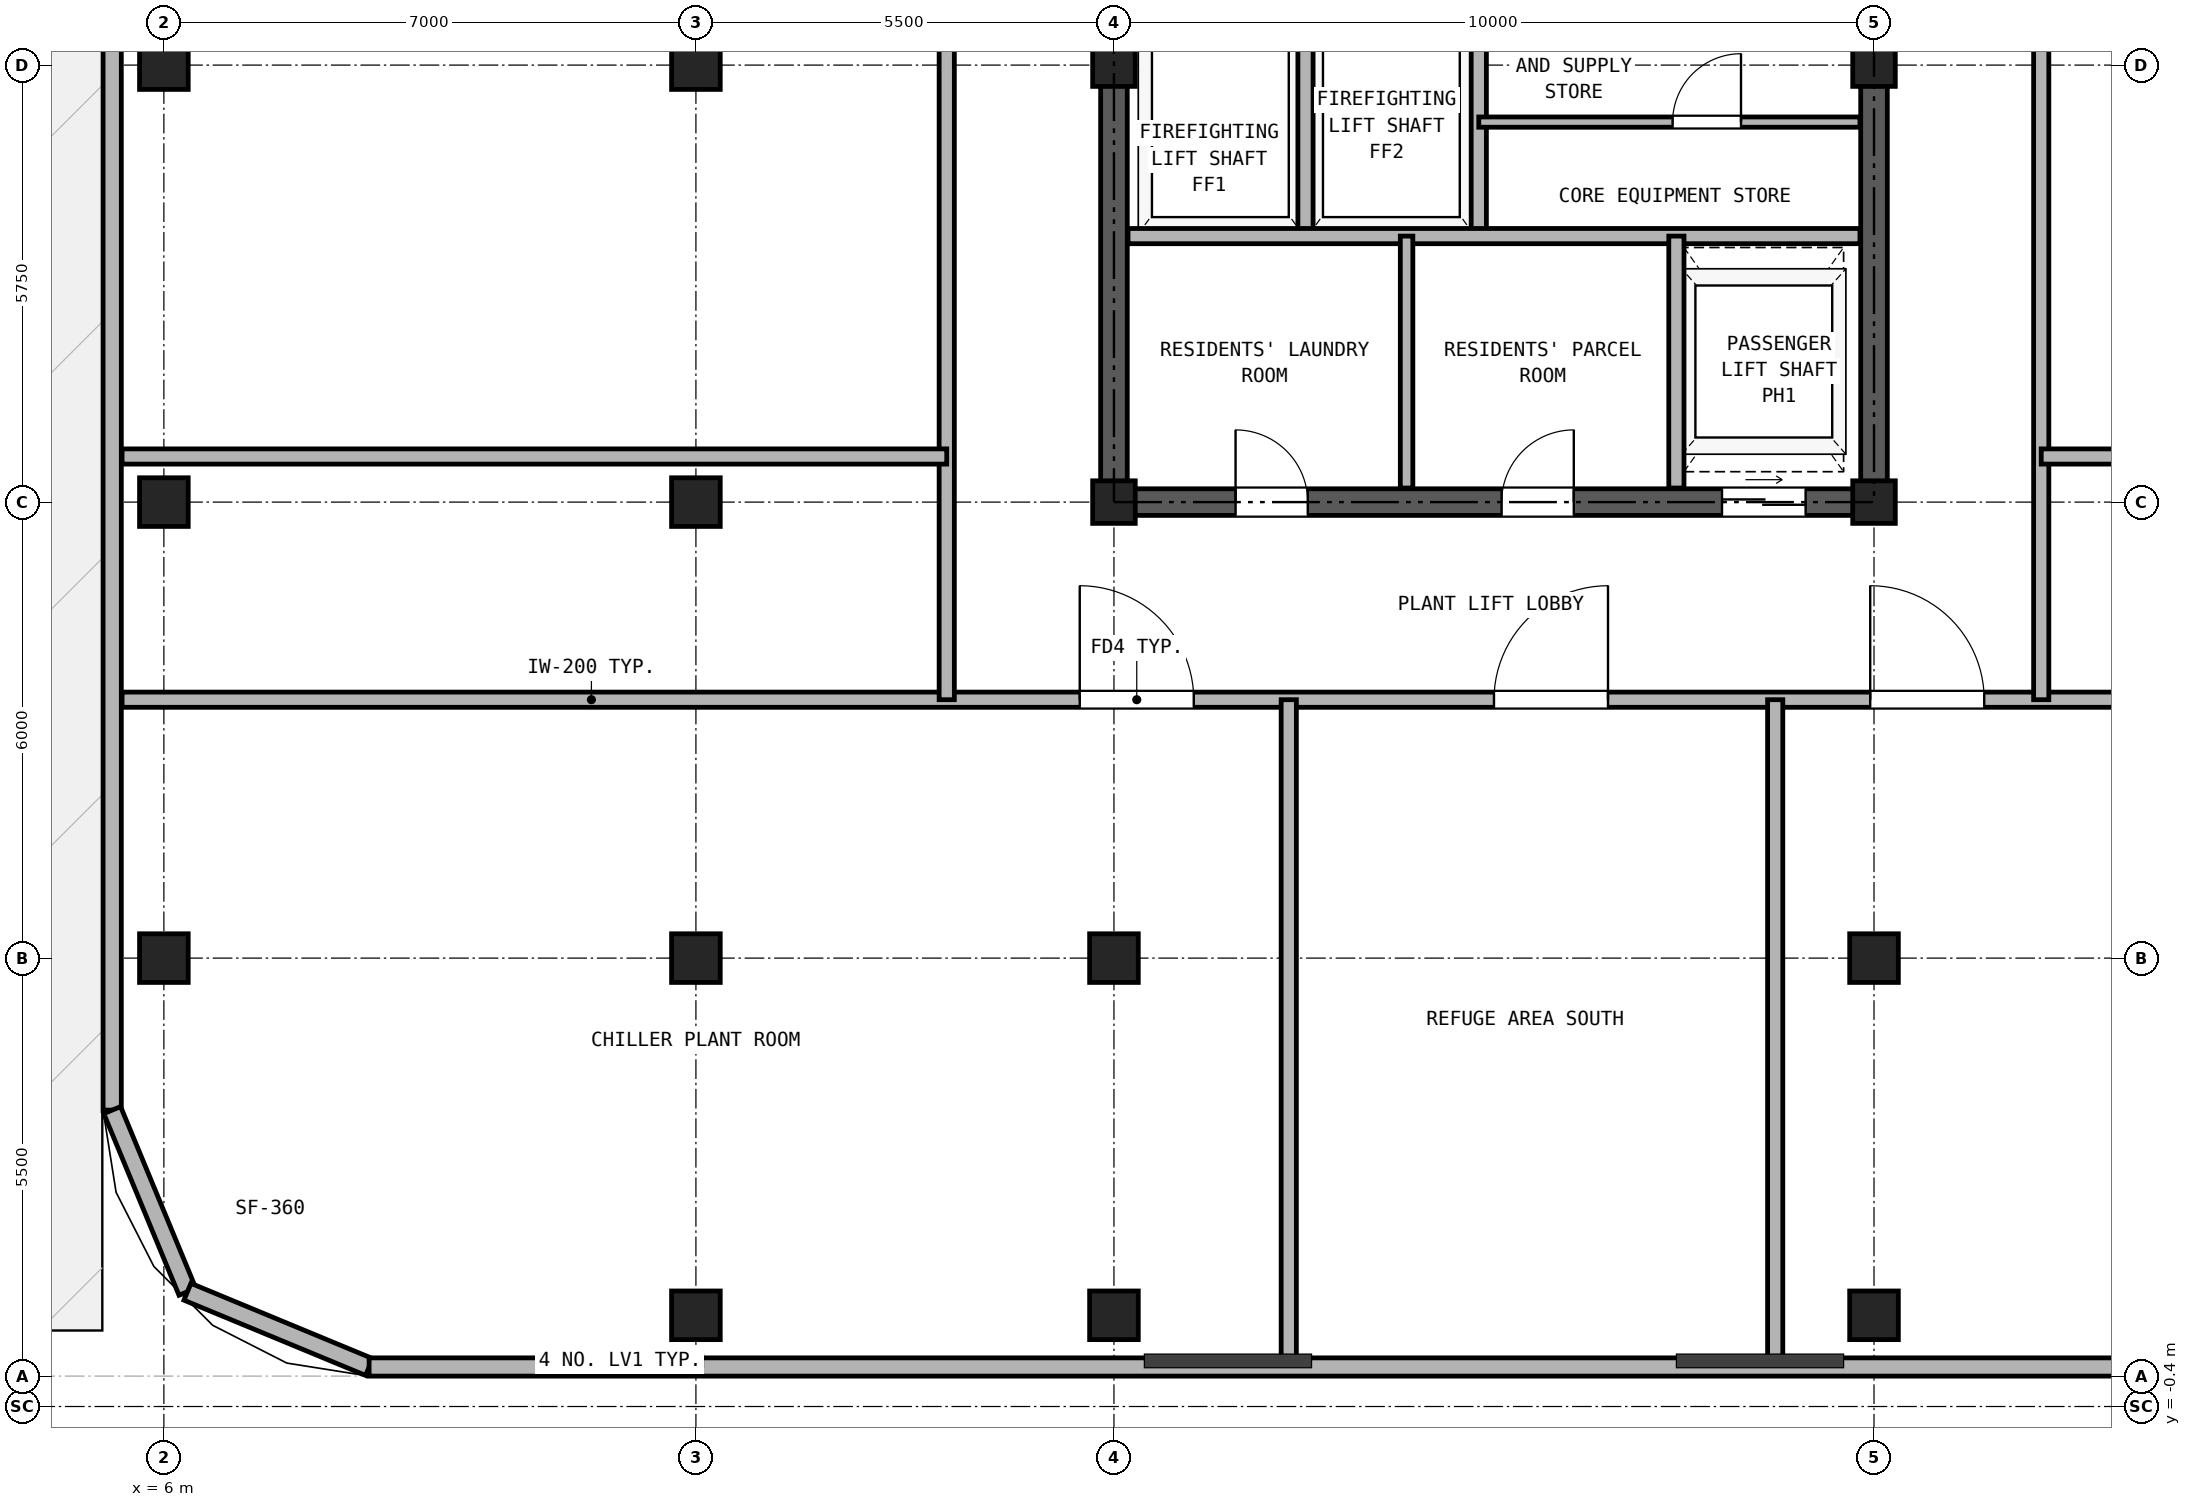
"""IFC4 building model, lengths in metres.
Left out: names, types, materials, properties, quantities, classifications, styles, units other than length and angle.
Written with IfcOpenShell. Run it as: python <this file> out.ifc"""

import sys

from ifc_helpers import new_model, si_unit, direction, frame, frame_2d, origin, origin_2d, place, context, subcontext, project, spatial, rectangle, hollow_rectangle, extrude, source, transform, mapped, element, fill, save


model = new_model("IFC4")
c1 = context("Model", 3, precision=1e-05, world=origin(), true_north=direction((0.0, 1.0)))
c2 = subcontext(c1, "Body", "Model", "MODEL_VIEW")
j1 = project(units=[si_unit("LENGTHUNIT", "METRE"), si_unit("PLANEANGLEUNIT", "RADIAN")], contexts=[c1])
p1 = place(None, origin())
s1 = spatial("IfcSite", under=j1, at=p1, CompositionType="ELEMENT")
p2 = place(p1, origin())
s2 = spatial("IfcBuilding", under=s1, at=p2, CompositionType="ELEMENT")
p3 = place(p2, frame((0.0, 0.0, 215.6)))
s3 = spatial("IfcBuildingStorey", under=s2, at=p3, CompositionType="ELEMENT", Elevation=215.6)
m1 = source(origin(), c2, "Body", "SweptSolid", [
    extrude(hollow_rectangle(XDim=0.64, YDim=0.64, WallThickness=0.035, at=origin_2d()), origin(), (0.0, 0.0, 1.0), 4.28),
])
for number, where, z_axis, x_axis in (
    (1, (13.0, 0.8, 0.0), (0.0, 0.0, 1.0), (1.0, 0.0, 0.0)),
    (2, (18.5, 0.8, 0.0), (0.0, 0.0, 1.0), (1.0, 0.0, 0.0)),
    (3, (28.5, 0.8, 0.0), (0.0, 0.0, 1.0), (1.0, 0.0, 0.0)),
    (4, (6.0, 5.5, 0.0), (0.0, 0.0, 1.0), (1.0, 0.0, 0.0)),
    (5, (6.0, 11.5, 0.0), (0.0, 0.0, 1.0), (1.0, 0.0, 0.0)),
    (6, (6.0, 17.25, 0.0), (0.0, 0.0, 1.0), (1.0, 0.0, 0.0)),
    (7, (13.0, 5.5, 0.0), (0.0, 0.0, 1.0), (1.0, 0.0, 0.0)),
    (8, (13.0, 11.5, 0.0), (0.0, 0.0, 1.0), (1.0, 0.0, 0.0)),
    (9, (13.0, 17.25, 0.0), (0.0, 0.0, 1.0), (1.0, 0.0, 0.0)),
    (10, (18.5, 5.5, 0.0), (0.0, 0.0, 1.0), (1.0, 0.0, 0.0)),
):
    element("IfcColumn", number, at=place(p3, frame(where, z_axis=z_axis, x_axis=x_axis)), inside=s3, PredefinedType="COLUMN", context=c2, shape_type="MappedRepresentation", body=[
        mapped(m1, transform((0.0, 0.0, 0.0), x_axis=(1.0, 0.0, 0.0), y_axis=(0.0, 1.0, 0.0), z_axis=(0.0, 0.0, 1.0), scale=1.0)),
    ])
m2 = source(origin(), c2, "Body", "SweptSolid", [
    extrude(hollow_rectangle(XDim=0.56, YDim=0.56, WallThickness=0.03, at=origin_2d()), origin(), (0.0, 0.0, 1.0), 4.28),
])
for number, where, z_axis, x_axis in (
    (11, (18.5, 11.5, 0.0), (0.0, 0.0, 1.0), (1.0, 0.0, 0.0)),
    (12, (18.5, 17.25, 0.0), (0.0, 0.0, 1.0), (1.0, 0.0, 0.0)),
):
    element("IfcColumn", number, at=place(p3, frame(where, z_axis=z_axis, x_axis=x_axis)), inside=s3, PredefinedType="COLUMN", context=c2, shape_type="MappedRepresentation", body=[
        mapped(m2, transform((0.0, 0.0, 0.0), x_axis=(1.0, 0.0, 0.0), y_axis=(0.0, 1.0, 0.0), z_axis=(0.0, 0.0, 1.0), scale=1.0)),
    ])
p4 = place(p3, frame((28.5, 5.5, 0.0), z_axis=(0.0, 0.0, 1.0), x_axis=(1.0, 0.0, 0.0)))
e13 = element("IfcColumn", 13, at=p4, inside=s3, PredefinedType="COLUMN", context=c2, shape_type="MappedRepresentation", body=[
    mapped(m1, transform((0.0, 0.0, 0.0), x_axis=(1.0, 0.0, 0.0), y_axis=(0.0, 1.0, 0.0), z_axis=(0.0, 0.0, 1.0), scale=1.0)),
])
for number, where, z_axis, x_axis in (
    (14, (28.5, 11.5, 0.0), (0.0, 0.0, 1.0), (1.0, 0.0, 0.0)),
    (15, (28.5, 17.25, 0.0), (0.0, 0.0, 1.0), (1.0, 0.0, 0.0)),
):
    element("IfcColumn", number, at=place(p3, frame(where, z_axis=z_axis, x_axis=x_axis)), inside=s3, PredefinedType="COLUMN", context=c2, shape_type="MappedRepresentation", body=[
        mapped(m2, transform((0.0, 0.0, 0.0), x_axis=(1.0, 0.0, 0.0), y_axis=(0.0, 1.0, 0.0), z_axis=(0.0, 0.0, 1.0), scale=1.0)),
    ])
p5 = place(p3, frame((5.32, 31.8, 0.0), z_axis=(0.0, 0.0, 1.0), x_axis=(0.0, -1.0, 0.0)))
e16 = element("IfcWall", 16, at=p5, inside=s3, PredefinedType="SOLIDWALL", context=c2, shape_type="SweptSolid", body=[
    extrude(rectangle(XDim=28.3, YDim=0.24, at=frame_2d((14.15, 0.0))), origin(), (0.0, 0.0, 1.0), 4.28),
])
for number, where, z_axis, x_axis in (
    (17, (5.32, 3.5, 0.0), (0.0, 0.0, 1.0), (0.383, -0.924, 0.0)),
    (18, (6.31, 1.11, 0.0), (0.0, 0.0, 1.0), (0.924, -0.383, 0.0)),
):
    element("IfcWall", number, at=place(p3, frame(where, z_axis=z_axis, x_axis=x_axis)), inside=s3, PredefinedType="SOLIDWALL", context=c2, shape_type="SweptSolid", body=[
        extrude(rectangle(XDim=2.587, YDim=0.24, at=frame_2d((1.293, 0.0))), origin(), (0.0, 0.0, 1.0), 4.28),
    ])
p6 = place(p3, frame((8.7, 0.12, 0.0), z_axis=(0.0, 0.0, 1.0), x_axis=(1.0, 0.0, 0.0)))
e19 = element("IfcWall", 19, at=p6, inside=s3, PredefinedType="SOLIDWALL", context=c2, shape_type="SweptSolid", body=[
    extrude(rectangle(XDim=29.6, YDim=0.24, at=frame_2d((14.8, 0.0))), origin(), (0.0, 0.0, 1.0), 4.28),
])
p7 = place(p3, frame((18.325, 11.5, 0.0), z_axis=(0.0, 0.0, 1.0), x_axis=(1.0, 0.0, 0.0)))
e20 = element("IfcWall", 20, at=p7, inside=s3, PredefinedType="SHEAR", context=c2, shape_type="SweptSolid", body=[
    extrude(rectangle(XDim=10.35, YDim=0.35, at=frame_2d((5.175, 0.0))), origin(), (0.0, 0.0, 1.0), 4.28),
])
p8 = place(p7, frame((1.775, 0.0, 0.0)))
e21 = element("IfcOpeningElement", 21, at=p8, cuts=e20, PredefinedType="OPENING", context=c2, shape_type="SweptSolid", body=[
    extrude(rectangle(XDim=0.95, YDim=2.15, at=frame_2d((0.475, 1.075))), frame((0.0, 0.185, 0.0), z_axis=(0.0, -1.0, 0.0), x_axis=(1.0, 0.0, 0.0)), (0.0, 0.0, 1.0), 0.37),
])
p9 = place(p7, frame((5.275, 0.0, 0.0)))
e22 = element("IfcOpeningElement", 22, at=p9, cuts=e20, PredefinedType="OPENING", context=c2, shape_type="SweptSolid", body=[
    extrude(rectangle(XDim=0.95, YDim=2.15, at=frame_2d((0.475, 1.075))), frame((0.0, 0.185, 0.0), z_axis=(0.0, -1.0, 0.0), x_axis=(1.0, 0.0, 0.0)), (0.0, 0.0, 1.0), 0.37),
])
p10 = place(p7, frame((8.175, 0.0, 0.0)))
e23 = element("IfcOpeningElement", 23, at=p10, cuts=e20, PredefinedType="OPENING", context=c2, shape_type="SweptSolid", body=[
    extrude(rectangle(XDim=1.1, YDim=2.25, at=frame_2d((0.55, 1.125))), frame((0.0, 0.185, 0.0), z_axis=(0.0, -1.0, 0.0), x_axis=(1.0, 0.0, 0.0)), (0.0, 0.0, 1.0), 0.37),
])
p11 = place(p3, frame((18.5, 11.675, 0.0), z_axis=(0.0, 0.0, 1.0), x_axis=(0.0, 1.0, 0.0)))
e24 = element("IfcWall", 24, at=p11, inside=s3, PredefinedType="SHEAR", context=c2, shape_type="SweptSolid", body=[
    extrude(rectangle(XDim=16.9, YDim=0.35, at=frame_2d((8.45, 0.0))), origin(), (0.0, 0.0, 1.0), 4.28),
])
p12 = place(p11, frame((7.475, 0.0, 0.0)))
e25 = element("IfcOpeningElement", 25, at=p12, cuts=e24, PredefinedType="OPENING", context=c2, shape_type="SweptSolid", body=[
    extrude(rectangle(XDim=1.15, YDim=2.2, at=frame_2d((0.575, 1.1))), frame((0.0, 0.185, 0.0), z_axis=(0.0, -1.0, 0.0), x_axis=(1.0, 0.0, 0.0)), (0.0, 0.0, 1.0), 0.37),
])
p13 = place(p3, frame((28.5, 11.675, 0.0), z_axis=(0.0, 0.0, 1.0), x_axis=(0.0, 1.0, 0.0)))
e26 = element("IfcWall", 26, at=p13, inside=s3, PredefinedType="SHEAR", context=c2, shape_type="SweptSolid", body=[
    extrude(rectangle(XDim=16.9, YDim=0.35, at=frame_2d((8.45, 0.0))), origin(), (0.0, 0.0, 1.0), 4.28),
])
p14 = place(p13, frame((7.475, 0.0, 0.0)))
e27 = element("IfcOpeningElement", 27, at=p14, cuts=e26, PredefinedType="OPENING", context=c2, shape_type="SweptSolid", body=[
    extrude(rectangle(XDim=1.15, YDim=2.2, at=frame_2d((0.575, 1.1))), frame((0.0, 0.185, 0.0), z_axis=(0.0, -1.0, 0.0), x_axis=(1.0, 0.0, 0.0)), (0.0, 0.0, 1.0), 0.37),
])
for number, where, z_axis, x_axis in (
    (28, (21.02, 15.0, 0.0), (0.0, 0.0, 1.0), (0.0, 1.0, 0.0)),
    (29, (23.3, 15.0, 0.0), (0.0, 0.0, 1.0), (0.0, 1.0, 0.0)),
):
    element("IfcWall", number, at=place(p3, frame(where, z_axis=z_axis, x_axis=x_axis)), inside=s3, PredefinedType="PARTITIONING", context=c2, shape_type="SweptSolid", body=[
        extrude(rectangle(XDim=3.0, YDim=0.2, at=frame_2d((1.5, 0.0))), origin(), (0.0, 0.0, 1.0), 4.28),
    ])
p15 = place(p3, frame((18.685, 15.0, 0.0), z_axis=(0.0, 0.0, 1.0), x_axis=(1.0, 0.0, 0.0)))
e30 = element("IfcWall", 30, at=p15, inside=s3, PredefinedType="PARTITIONING", context=c2, shape_type="SweptSolid", body=[
    extrude(rectangle(XDim=9.63, YDim=0.2, at=frame_2d((4.815, 0.0))), origin(), (0.0, 0.0, 1.0), 4.28),
])
p16 = place(p3, frame((23.3, 16.5, 0.0), z_axis=(0.0, 0.0, 1.0), x_axis=(1.0, 0.0, 0.0)))
e31 = element("IfcWall", 31, at=p16, inside=s3, PredefinedType="PARTITIONING", context=c2, shape_type="SweptSolid", body=[
    extrude(rectangle(XDim=5.015, YDim=0.135, at=frame_2d((2.507, 0.0))), origin(), (0.0, 0.0, 1.0), 4.28),
])
p17 = place(p16, frame((2.55, 0.0, 0.0)))
e32 = element("IfcOpeningElement", 32, at=p17, cuts=e31, PredefinedType="OPENING", context=c2, shape_type="SweptSolid", body=[
    extrude(rectangle(XDim=0.9, YDim=2.05, at=frame_2d((0.45, 1.025))), frame((0.0, 0.077, 0.0), z_axis=(0.0, -1.0, 0.0), x_axis=(1.0, 0.0, 0.0)), (0.0, 0.0, 1.0), 0.155),
])
p18 = place(p3, frame((22.35, 11.685, 0.0), z_axis=(0.0, 0.0, 1.0), x_axis=(0.0, 1.0, 0.0)))
e33 = element("IfcWall", 33, at=p18, inside=s3, PredefinedType="PARTITIONING", context=c2, shape_type="SweptSolid", body=[
    extrude(rectangle(XDim=3.315, YDim=0.165, at=frame_2d((1.657, 0.0))), origin(), (0.0, 0.0, 1.0), 4.28),
])
p19 = place(p3, frame((25.9, 11.685, 0.0), z_axis=(0.0, 0.0, 1.0), x_axis=(0.0, 1.0, 0.0)))
e34 = element("IfcWall", 34, at=p19, inside=s3, PredefinedType="PARTITIONING", context=c2, shape_type="SweptSolid", body=[
    extrude(rectangle(XDim=3.315, YDim=0.2, at=frame_2d((1.657, 0.0))), origin(), (0.0, 0.0, 1.0), 4.28),
])
p20 = place(p3, frame((5.45, 8.9, 0.0), z_axis=(0.0, 0.0, 1.0), x_axis=(1.0, 0.0, 0.0)))
e35 = element("IfcWall", 35, at=p20, inside=s3, PredefinedType="PARTITIONING", context=c2, shape_type="SweptSolid", body=[
    extrude(rectangle(XDim=36.1, YDim=0.2, at=frame_2d((18.05, 0.0))), origin(), (0.0, 0.0, 1.0), 4.28),
])
p21 = place(p20, frame((12.6, 0.0, 0.0)))
e36 = element("IfcOpeningElement", 36, at=p21, cuts=e35, PredefinedType="OPENING", context=c2, shape_type="SweptSolid", body=[
    extrude(rectangle(XDim=1.5, YDim=2.25, at=frame_2d((0.75, 1.125))), frame((0.0, 0.11, 0.0), z_axis=(0.0, -1.0, 0.0), x_axis=(1.0, 0.0, 0.0)), (0.0, 0.0, 1.0), 0.22),
])
p22 = place(p20, frame((18.05, 0.0, 0.0)))
e37 = element("IfcOpeningElement", 37, at=p22, cuts=e35, PredefinedType="OPENING", context=c2, shape_type="SweptSolid", body=[
    extrude(rectangle(XDim=1.5, YDim=2.25, at=frame_2d((0.75, 1.125))), frame((0.0, 0.11, 0.0), z_axis=(0.0, -1.0, 0.0), x_axis=(1.0, 0.0, 0.0)), (0.0, 0.0, 1.0), 0.22),
])
p23 = place(p20, frame((23.0, 0.0, 0.0)))
e38 = element("IfcOpeningElement", 38, at=p23, cuts=e35, PredefinedType="OPENING", context=c2, shape_type="SweptSolid", body=[
    extrude(rectangle(XDim=1.5, YDim=2.25, at=frame_2d((0.75, 1.125))), frame((0.0, 0.11, 0.0), z_axis=(0.0, -1.0, 0.0), x_axis=(1.0, 0.0, 0.0)), (0.0, 0.0, 1.0), 0.22),
])
p24 = place(p3, frame((16.3, 8.9, 0.0), z_axis=(0.0, 0.0, 1.0), x_axis=(0.0, 1.0, 0.0)))
e39 = element("IfcWall", 39, at=p24, inside=s3, PredefinedType="PARTITIONING", context=c2, shape_type="SweptSolid", body=[
    extrude(rectangle(XDim=19.85, YDim=0.2, at=frame_2d((9.925, 0.0))), origin(), (0.0, 0.0, 1.0), 4.28),
])
p25 = place(p24, frame((10.6, 0.0, 0.0)))
e40 = element("IfcOpeningElement", 40, at=p25, cuts=e39, PredefinedType="OPENING", context=c2, shape_type="SweptSolid", body=[
    extrude(rectangle(XDim=1.05, YDim=2.15, at=frame_2d((0.525, 1.075))), frame((0.0, 0.11, 0.0), z_axis=(0.0, -1.0, 0.0), x_axis=(1.0, 0.0, 0.0)), (0.0, 0.0, 1.0), 0.22),
])
p26 = place(p3, frame((30.7, 8.9, 0.0), z_axis=(0.0, 0.0, 1.0), x_axis=(0.0, 1.0, 0.0)))
e41 = element("IfcWall", 41, at=p26, inside=s3, PredefinedType="PARTITIONING", context=c2, shape_type="SweptSolid", body=[
    extrude(rectangle(XDim=19.85, YDim=0.2, at=frame_2d((9.925, 0.0))), origin(), (0.0, 0.0, 1.0), 4.28),
])
p27 = place(p26, frame((10.6, 0.0, 0.0)))
e42 = element("IfcOpeningElement", 42, at=p27, cuts=e41, PredefinedType="OPENING", context=c2, shape_type="SweptSolid", body=[
    extrude(rectangle(XDim=1.5, YDim=2.25, at=frame_2d((0.75, 1.125))), frame((0.0, 0.11, 0.0), z_axis=(0.0, -1.0, 0.0), x_axis=(1.0, 0.0, 0.0)), (0.0, 0.0, 1.0), 0.22),
])
for number, where, z_axis, x_axis in (
    (43, (20.8, 0.25, 0.0), (0.0, 0.0, 1.0), (0.0, 1.0, 0.0)),
    (44, (27.2, 0.25, 0.0), (0.0, 0.0, 1.0), (0.0, 1.0, 0.0)),
):
    element("IfcWall", number, at=place(p3, frame(where, z_axis=z_axis, x_axis=x_axis)), inside=s3, PredefinedType="PARTITIONING", context=c2, shape_type="SweptSolid", body=[
        extrude(rectangle(XDim=8.65, YDim=0.2, at=frame_2d((4.325, 0.0))), origin(), (0.0, 0.0, 1.0), 4.28),
    ])
for number, where, z_axis, x_axis in (
    (45, (5.45, 12.1, 0.0), (0.0, 0.0, 1.0), (1.0, 0.0, 0.0)),
    (46, (30.7, 12.1, 0.0), (0.0, 0.0, 1.0), (1.0, 0.0, 0.0)),
):
    element("IfcWall", number, at=place(p3, frame(where, z_axis=z_axis, x_axis=x_axis)), inside=s3, PredefinedType="PARTITIONING", context=c2, shape_type="SweptSolid", body=[
        extrude(rectangle(XDim=10.85, YDim=0.2, at=frame_2d((5.425, 0.0))), origin(), (0.0, 0.0, 1.0), 4.28),
    ])
p28 = place(p17, frame((0.9, 0.0, 0.0), z_axis=(0.0, 0.0, 1.0), x_axis=(-1.0, 0.0, 0.0)))
e47 = element("IfcDoor", 47, at=p28, inside=s3, OperationType="SINGLE_SWING_RIGHT", PredefinedType="DOOR", context=c2, shape_type="SweptSolid", body=[
    extrude(rectangle(XDim=0.9, YDim=2.05, at=frame_2d((0.45, 1.025))), frame((0.0, 0.025, 0.0), z_axis=(0.0, -1.0, 0.0), x_axis=(1.0, 0.0, 0.0)), (0.0, 0.0, 1.0), 0.05),
])
fill(e32, e47)
p29 = place(p8, frame((0.95, 0.0, 0.0), z_axis=(0.0, 0.0, 1.0), x_axis=(-1.0, 0.0, 0.0)))
e48 = element("IfcDoor", 48, at=p29, inside=s3, OperationType="SINGLE_SWING_LEFT", PredefinedType="DOOR", context=c2, shape_type="SweptSolid", body=[
    extrude(rectangle(XDim=0.95, YDim=2.15, at=frame_2d((0.475, 1.075))), frame((0.0, 0.025, 0.0), z_axis=(0.0, -1.0, 0.0), x_axis=(1.0, 0.0, 0.0)), (0.0, 0.0, 1.0), 0.05),
])
fill(e21, e48)
p30 = place(p9, frame((0.95, 0.0, 0.0), z_axis=(0.0, 0.0, 1.0), x_axis=(-1.0, 0.0, 0.0)))
e49 = element("IfcDoor", 49, at=p30, inside=s3, OperationType="SINGLE_SWING_RIGHT", PredefinedType="DOOR", context=c2, shape_type="SweptSolid", body=[
    extrude(rectangle(XDim=0.95, YDim=2.15, at=frame_2d((0.475, 1.075))), frame((0.0, 0.025, 0.0), z_axis=(0.0, -1.0, 0.0), x_axis=(1.0, 0.0, 0.0)), (0.0, 0.0, 1.0), 0.05),
])
fill(e22, e49)
p31 = place(p10, frame((1.1, 0.0, 0.0), z_axis=(0.0, 0.0, 1.0), x_axis=(-1.0, 0.0, 0.0)))
e50 = element("IfcDoor", 50, at=p31, inside=s3, OperationType="DOUBLE_DOOR_SLIDING", PredefinedType="DOOR", context=c2, shape_type="SweptSolid", body=[
    extrude(rectangle(XDim=1.1, YDim=2.25, at=frame_2d((0.55, 1.125))), frame((0.0, 0.025, 0.0), z_axis=(0.0, -1.0, 0.0), x_axis=(1.0, 0.0, 0.0)), (0.0, 0.0, 1.0), 0.05),
])
fill(e23, e50)
p32 = place(p21, frame((1.5, 0.0, 0.0), z_axis=(0.0, 0.0, 1.0), x_axis=(-1.0, 0.0, 0.0)))
e51 = element("IfcDoor", 51, at=p32, inside=s3, OperationType="SINGLE_SWING_LEFT", PredefinedType="DOOR", context=c2, shape_type="SweptSolid", body=[
    extrude(rectangle(XDim=1.5, YDim=2.25, at=frame_2d((0.75, 1.125))), frame((0.0, 0.025, 0.0), z_axis=(0.0, -1.0, 0.0), x_axis=(1.0, 0.0, 0.0)), (0.0, 0.0, 1.0), 0.05),
])
fill(e36, e51)
p33 = place(p22, frame((1.5, 0.0, 0.0), z_axis=(0.0, 0.0, 1.0), x_axis=(-1.0, 0.0, 0.0)))
e52 = element("IfcDoor", 52, at=p33, inside=s3, OperationType="SINGLE_SWING_RIGHT", PredefinedType="DOOR", context=c2, shape_type="SweptSolid", body=[
    extrude(rectangle(XDim=1.5, YDim=2.25, at=frame_2d((0.75, 1.125))), frame((0.0, 0.025, 0.0), z_axis=(0.0, -1.0, 0.0), x_axis=(1.0, 0.0, 0.0)), (0.0, 0.0, 1.0), 0.05),
])
fill(e37, e52)
p34 = place(p23, frame((1.5, 0.0, 0.0), z_axis=(0.0, 0.0, 1.0), x_axis=(-1.0, 0.0, 0.0)))
e53 = element("IfcDoor", 53, at=p34, inside=s3, OperationType="SINGLE_SWING_LEFT", PredefinedType="DOOR", context=c2, shape_type="SweptSolid", body=[
    extrude(rectangle(XDim=1.5, YDim=2.25, at=frame_2d((0.75, 1.125))), frame((0.0, 0.025, 0.0), z_axis=(0.0, -1.0, 0.0), x_axis=(1.0, 0.0, 0.0)), (0.0, 0.0, 1.0), 0.05),
])
fill(e38, e53)
save(model, sys.argv[1])
